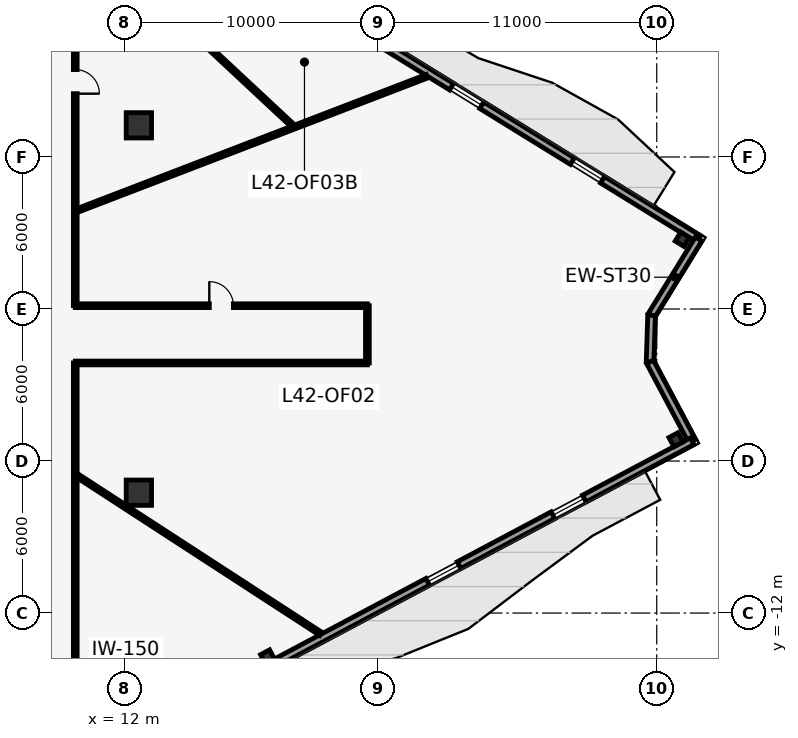
"""IFC4 building model, lengths in metres.
Left out: names, types, materials, properties, quantities, classifications, styles, units other than length and angle.
Written with IfcOpenShell. Run it as: python <this file> out.ifc"""

import sys

from ifc_helpers import new_model, si_unit, direction, frame, frame_2d, origin, origin_2d, place, context, subcontext, project, spatial, rectangle, i_section, extrude, element, fill, save


model = new_model("IFC4")
c1 = context("Model", 3, precision=1e-05, world=origin(), true_north=direction((0.0, 1.0)))
c2 = subcontext(c1, "Body", "Model", "MODEL_VIEW")
j1 = project(units=[si_unit("LENGTHUNIT", "METRE"), si_unit("PLANEANGLEUNIT", "RADIAN")], contexts=[c1])
p1 = place(None, origin())
s1 = spatial("IfcSite", under=j1, at=p1, CompositionType="ELEMENT")
p2 = place(p1, origin())
s2 = spatial("IfcBuilding", under=s1, at=p2, CompositionType="ELEMENT")
p3 = place(p2, frame((0.0, 0.0, 181.9)))
s3 = spatial("IfcBuildingStorey", under=s2, at=p3, CompositionType="ELEMENT", Elevation=181.9)
for number, where, z_axis, x_axis in (
    (1, (12.56, -7.25, 0.0), (0.0, 0.0, 1.0), (1.0, 0.0, 0.0)),
    (2, (12.56, 7.25, 0.0), (0.0, 0.0, 1.0), (1.0, 0.0, 0.0)),
):
    element("IfcColumn", number, at=place(p3, frame(where, z_axis=z_axis, x_axis=x_axis)), inside=s3, PredefinedType="COLUMN", context=c2, shape_type="SweptSolid", body=[
        extrude(rectangle(XDim=1.0, YDim=1.0, at=origin_2d()), origin(), (0.0, 0.0, 1.0), 4.1),
    ])
for number, where, z_axis, x_axis in (
    (3, (17.639, -13.731, 0.0), (0.0, 0.0, 1.0), (0.883, 0.469, 0.0)),
    (4, (33.759, -5.16, 0.0), (0.0, 0.0, 1.0), (0.883, 0.469, 0.0)),
    (5, (34.011, 2.752, 0.0), (0.0, 0.0, 1.0), (-0.851, 0.525, 0.0)),
):
    element("IfcColumn", number, at=place(p3, frame(where, z_axis=z_axis, x_axis=x_axis)), inside=s3, PredefinedType="COLUMN", context=c2, shape_type="SweptSolid", body=[
        extrude(i_section(OverallWidth=0.406, OverallDepth=0.417, WebThickness=0.03, FlangeThickness=0.048, at=origin_2d()), origin(), (0.0, 0.0, 1.0), 4.1),
    ])
p4 = place(p3, frame((-12.255, 31.689, 0.0), z_axis=(0.0, 0.0, 1.0), x_axis=(0.851166647402, -0.524895549944, 0.0)))
e6 = element("IfcWall", 6, at=p4, inside=s3, PredefinedType="STANDARD", context=c2, shape_type="SweptSolid", body=[
    extrude(rectangle(XDim=55.111, YDim=0.3, at=frame_2d((27.555, 0.0))), origin(), (0.0, 0.0, 1.0), 3.85),
])
p5 = place(p4, frame((27.055, 0.0, 0.0)))
e7 = element("IfcOpeningElement", 7, at=p5, cuts=e6, PredefinedType="OPENING", context=c2, shape_type="SweptSolid", body=[
    extrude(rectangle(XDim=1.0, YDim=2.15, at=frame_2d((0.5, 1.075))), frame((0.0, 0.16, 0.0), z_axis=(0.0, -1.0, 0.0), x_axis=(1.0, 0.0, 0.0)), (0.0, 0.0, 1.0), 0.32),
])
p6 = place(p4, frame((4.455, 0.0, 0.85)))
e8 = element("IfcOpeningElement", 8, at=p6, cuts=e6, PredefinedType="OPENING", context=c2, shape_type="SweptSolid", body=[
    extrude(rectangle(XDim=1.4, YDim=2.2, at=frame_2d((0.7, 1.1))), frame((0.0, 0.16, 0.0), z_axis=(0.0, -1.0, 0.0), x_axis=(1.0, 0.0, 0.0)), (0.0, 0.0, 1.0), 0.32),
])
p7 = place(p4, frame((10.055, 0.0, 0.85)))
e9 = element("IfcOpeningElement", 9, at=p7, cuts=e6, PredefinedType="OPENING", context=c2, shape_type="SweptSolid", body=[
    extrude(rectangle(XDim=1.4, YDim=2.2, at=frame_2d((0.7, 1.1))), frame((0.0, 0.16, 0.0), z_axis=(0.0, -1.0, 0.0), x_axis=(1.0, 0.0, 0.0)), (0.0, 0.0, 1.0), 0.32),
])
p8 = place(p4, frame((15.655, 0.0, 0.85)))
e10 = element("IfcOpeningElement", 10, at=p8, cuts=e6, PredefinedType="OPENING", context=c2, shape_type="SweptSolid", body=[
    extrude(rectangle(XDim=1.4, YDim=2.2, at=frame_2d((0.7, 1.1))), frame((0.0, 0.16, 0.0), z_axis=(0.0, -1.0, 0.0), x_axis=(1.0, 0.0, 0.0)), (0.0, 0.0, 1.0), 0.32),
])
p9 = place(p4, frame((21.255, 0.0, 0.85)))
e11 = element("IfcOpeningElement", 11, at=p9, cuts=e6, PredefinedType="OPENING", context=c2, shape_type="SweptSolid", body=[
    extrude(rectangle(XDim=1.4, YDim=2.2, at=frame_2d((0.7, 1.1))), frame((0.0, 0.16, 0.0), z_axis=(0.0, -1.0, 0.0), x_axis=(1.0, 0.0, 0.0)), (0.0, 0.0, 1.0), 0.32),
])
p10 = place(p4, frame((32.455, 0.0, 0.85)))
e12 = element("IfcOpeningElement", 12, at=p10, cuts=e6, PredefinedType="OPENING", context=c2, shape_type="SweptSolid", body=[
    extrude(rectangle(XDim=1.4, YDim=2.2, at=frame_2d((0.7, 1.1))), frame((0.0, 0.16, 0.0), z_axis=(0.0, -1.0, 0.0), x_axis=(1.0, 0.0, 0.0)), (0.0, 0.0, 1.0), 0.32),
])
p11 = place(p4, frame((38.055, 0.0, 0.85)))
e13 = element("IfcOpeningElement", 13, at=p11, cuts=e6, PredefinedType="OPENING", context=c2, shape_type="SweptSolid", body=[
    extrude(rectangle(XDim=1.4, YDim=2.2, at=frame_2d((0.7, 1.1))), frame((0.0, 0.16, 0.0), z_axis=(0.0, -1.0, 0.0), x_axis=(1.0, 0.0, 0.0)), (0.0, 0.0, 1.0), 0.32),
])
p12 = place(p4, frame((43.655, 0.0, 0.85)))
e14 = element("IfcOpeningElement", 14, at=p12, cuts=e6, PredefinedType="OPENING", context=c2, shape_type="SweptSolid", body=[
    extrude(rectangle(XDim=1.4, YDim=2.2, at=frame_2d((0.7, 1.1))), frame((0.0, 0.16, 0.0), z_axis=(0.0, -1.0, 0.0), x_axis=(1.0, 0.0, 0.0)), (0.0, 0.0, 1.0), 0.32),
])
p13 = place(p4, frame((49.255, 0.0, 0.85)))
e15 = element("IfcOpeningElement", 15, at=p13, cuts=e6, PredefinedType="OPENING", context=c2, shape_type="SweptSolid", body=[
    extrude(rectangle(XDim=1.4, YDim=2.2, at=frame_2d((0.7, 1.1))), frame((0.0, 0.16, 0.0), z_axis=(0.0, -1.0, 0.0), x_axis=(1.0, 0.0, 0.0)), (0.0, 0.0, 1.0), 0.32),
])
p14 = place(p3, frame((34.653, 2.762, 0.0), z_axis=(0.0, 0.0, 1.0), x_axis=(-0.524920336071, -0.85115136185, 0.0)))
e16 = element("IfcWall", 16, at=p14, inside=s3, PredefinedType="STANDARD", context=c2, shape_type="SweptSolid", body=[
    extrude(rectangle(XDim=3.541, YDim=0.3, at=frame_2d((1.771, 0.0))), origin(), (0.0, 0.0, 1.0), 3.85),
])
p15 = place(p3, frame((32.794, -0.252, 0.0), z_axis=(0.0, 0.0, 1.0), x_axis=(-0.031873247483, -0.999491918974, 0.0)))
e17 = element("IfcWall", 17, at=p15, inside=s3, PredefinedType="STANDARD", context=c2, shape_type="SweptSolid", body=[
    extrude(rectangle(XDim=1.838, YDim=0.3, at=frame_2d((0.919, 0.0))), origin(), (0.0, 0.0, 1.0), 3.85),
])
p16 = place(p3, frame((32.736, -2.09, 0.0), z_axis=(0.0, 0.0, 1.0), x_axis=(0.469464339615, -0.882951433449, 0.0)))
e18 = element("IfcWall", 18, at=p16, inside=s3, PredefinedType="STANDARD", context=c2, shape_type="SweptSolid", body=[
    extrude(rectangle(XDim=3.542, YDim=0.3, at=frame_2d((1.771, 0.0))), origin(), (0.0, 0.0, 1.0), 3.85),
])
p17 = place(p3, frame((34.398, -5.217, 0.0), z_axis=(0.0, 0.0, 1.0), x_axis=(-0.88294811928, -0.469470572731, 0.0)))
e19 = element("IfcWall", 19, at=p17, inside=s3, PredefinedType="STANDARD", context=c2, shape_type="SweptSolid", body=[
    extrude(rectangle(XDim=55.845, YDim=0.3, at=frame_2d((27.923, 0.0))), origin(), (0.0, 0.0, 1.0), 3.85),
])
p18 = place(p17, frame((27.423, 0.0, 0.0)))
e20 = element("IfcOpeningElement", 20, at=p18, cuts=e19, PredefinedType="OPENING", context=c2, shape_type="SweptSolid", body=[
    extrude(rectangle(XDim=1.0, YDim=2.15, at=frame_2d((0.5, 1.075))), frame((0.0, 0.16, 0.0), z_axis=(0.0, -1.0, 0.0), x_axis=(1.0, 0.0, 0.0)), (0.0, 0.0, 1.0), 0.32),
])
p19 = place(p17, frame((4.823, 0.0, 0.85)))
e21 = element("IfcOpeningElement", 21, at=p19, cuts=e19, PredefinedType="OPENING", context=c2, shape_type="SweptSolid", body=[
    extrude(rectangle(XDim=1.4, YDim=2.2, at=frame_2d((0.7, 1.1))), frame((0.0, 0.16, 0.0), z_axis=(0.0, -1.0, 0.0), x_axis=(1.0, 0.0, 0.0)), (0.0, 0.0, 1.0), 0.32),
])
p20 = place(p17, frame((10.423, 0.0, 0.85)))
e22 = element("IfcOpeningElement", 22, at=p20, cuts=e19, PredefinedType="OPENING", context=c2, shape_type="SweptSolid", body=[
    extrude(rectangle(XDim=1.4, YDim=2.2, at=frame_2d((0.7, 1.1))), frame((0.0, 0.16, 0.0), z_axis=(0.0, -1.0, 0.0), x_axis=(1.0, 0.0, 0.0)), (0.0, 0.0, 1.0), 0.32),
])
p21 = place(p17, frame((21.623, 0.0, 0.85)))
e23 = element("IfcOpeningElement", 23, at=p21, cuts=e19, PredefinedType="OPENING", context=c2, shape_type="SweptSolid", body=[
    extrude(rectangle(XDim=1.4, YDim=2.2, at=frame_2d((0.7, 1.1))), frame((0.0, 0.16, 0.0), z_axis=(0.0, -1.0, 0.0), x_axis=(1.0, 0.0, 0.0)), (0.0, 0.0, 1.0), 0.32),
])
p22 = place(p17, frame((32.823, 0.0, 0.85)))
e24 = element("IfcOpeningElement", 24, at=p22, cuts=e19, PredefinedType="OPENING", context=c2, shape_type="SweptSolid", body=[
    extrude(rectangle(XDim=1.4, YDim=2.2, at=frame_2d((0.7, 1.1))), frame((0.0, 0.16, 0.0), z_axis=(0.0, -1.0, 0.0), x_axis=(1.0, 0.0, 0.0)), (0.0, 0.0, 1.0), 0.32),
])
p23 = place(p17, frame((38.423, 0.0, 0.85)))
e25 = element("IfcOpeningElement", 25, at=p23, cuts=e19, PredefinedType="OPENING", context=c2, shape_type="SweptSolid", body=[
    extrude(rectangle(XDim=1.4, YDim=2.2, at=frame_2d((0.7, 1.1))), frame((0.0, 0.16, 0.0), z_axis=(0.0, -1.0, 0.0), x_axis=(1.0, 0.0, 0.0)), (0.0, 0.0, 1.0), 0.32),
])
p24 = place(p17, frame((44.023, 0.0, 0.85)))
e26 = element("IfcOpeningElement", 26, at=p24, cuts=e19, PredefinedType="OPENING", context=c2, shape_type="SweptSolid", body=[
    extrude(rectangle(XDim=1.4, YDim=2.2, at=frame_2d((0.7, 1.1))), frame((0.0, 0.16, 0.0), z_axis=(0.0, -1.0, 0.0), x_axis=(1.0, 0.0, 0.0)), (0.0, 0.0, 1.0), 0.32),
])
p25 = place(p17, frame((49.623, 0.0, 0.85)))
e27 = element("IfcOpeningElement", 27, at=p25, cuts=e19, PredefinedType="OPENING", context=c2, shape_type="SweptSolid", body=[
    extrude(rectangle(XDim=1.4, YDim=2.2, at=frame_2d((0.7, 1.1))), frame((0.0, 0.16, 0.0), z_axis=(0.0, -1.0, 0.0), x_axis=(1.0, 0.0, 0.0)), (0.0, 0.0, 1.0), 0.32),
])
p26 = place(p3, frame((10.05, 14.31, 0.0), z_axis=(0.0, 0.0, 1.0), x_axis=(0.0, -1.0, 0.0)))
e28 = element("IfcWall", 28, at=p26, inside=s3, PredefinedType="PARTITIONING", context=c2, shape_type="SweptSolid", body=[
    extrude(rectangle(XDim=14.18, YDim=0.15, at=frame_2d((7.09, 0.0))), origin(), (0.0, 0.0, 1.0), 3.85),
])
p27 = place(p26, frame((4.861, 0.0, 0.0)))
e29 = element("IfcOpeningElement", 29, at=p27, cuts=e28, PredefinedType="OPENING", context=c2, shape_type="SweptSolid", body=[
    extrude(rectangle(XDim=0.95, YDim=2.15, at=frame_2d((0.475, 1.075))), frame((0.0, 0.085, 0.0), z_axis=(0.0, -1.0, 0.0), x_axis=(1.0, 0.0, 0.0)), (0.0, 0.0, 1.0), 0.17),
])
p28 = place(p3, frame((10.05, 0.13, 0.0), z_axis=(0.0, 0.0, 1.0), x_axis=(1.0, 0.0, 0.0)))
e30 = element("IfcWall", 30, at=p28, inside=s3, PredefinedType="PARTITIONING", context=c2, shape_type="SweptSolid", body=[
    extrude(rectangle(XDim=11.53, YDim=0.15, at=frame_2d((5.765, 0.0))), origin(), (0.0, 0.0, 1.0), 3.85),
])
p29 = place(p28, frame((5.29, 0.0, 0.0)))
e31 = element("IfcOpeningElement", 31, at=p29, cuts=e30, PredefinedType="OPENING", context=c2, shape_type="SweptSolid", body=[
    extrude(rectangle(XDim=0.95, YDim=2.15, at=frame_2d((0.475, 1.075))), frame((0.0, 0.085, 0.0), z_axis=(0.0, -1.0, 0.0), x_axis=(1.0, 0.0, 0.0)), (0.0, 0.0, 1.0), 0.17),
])
p30 = place(p3, frame((21.58, 0.13, 0.0), z_axis=(0.0, 0.0, 1.0), x_axis=(0.0, -1.0, 0.0)))
e32 = element("IfcWall", 32, at=p30, inside=s3, PredefinedType="PARTITIONING", context=c2, shape_type="SweptSolid", body=[
    extrude(rectangle(XDim=2.26, YDim=0.15, at=frame_2d((1.13, 0.0))), origin(), (0.0, 0.0, 1.0), 3.85),
])
p31 = place(p3, frame((21.58, -2.13, 0.0), z_axis=(0.0, 0.0, 1.0), x_axis=(-1.0, 0.0, 0.0)))
e33 = element("IfcWall", 33, at=p31, inside=s3, PredefinedType="PARTITIONING", context=c2, shape_type="SweptSolid", body=[
    extrude(rectangle(XDim=11.53, YDim=0.15, at=frame_2d((5.765, 0.0))), origin(), (0.0, 0.0, 1.0), 3.85),
])
p32 = place(p3, frame((10.05, -2.13, 0.0), z_axis=(0.0, 0.0, 1.0), x_axis=(0.0, -1.0, 0.0)))
e34 = element("IfcWall", 34, at=p32, inside=s3, PredefinedType="PARTITIONING", context=c2, shape_type="SweptSolid", body=[
    extrude(rectangle(XDim=12.539, YDim=0.15, at=frame_2d((6.27, 0.0))), origin(), (0.0, 0.0, 1.0), 3.85),
])
p33 = place(p3, frame((10.155, 3.898, 0.0), z_axis=(0.0, 0.0, 1.0), x_axis=(0.933582173368, 0.358363398759, 0.0)))
e35 = element("IfcWall", 35, at=p33, inside=s3, PredefinedType="PARTITIONING", context=c2, shape_type="SweptSolid", body=[
    extrude(rectangle(XDim=14.75, YDim=0.15, at=frame_2d((7.375, 0.0))), origin(), (0.0, 0.0, 1.0), 3.85),
])
p34 = place(p3, frame((10.155, -6.595, 0.0), z_axis=(0.0, 0.0, 1.0), x_axis=(0.838665527381, -0.544646796725, 0.0)))
e36 = element("IfcWall", 36, at=p34, inside=s3, PredefinedType="PARTITIONING", context=c2, shape_type="SweptSolid", body=[
    extrude(rectangle(XDim=11.433, YDim=0.15, at=frame_2d((5.717, 0.0))), origin(), (0.0, 0.0, 1.0), 3.85),
])
p35 = place(p3, frame((18.675, 7.196, 0.0), z_axis=(0.0, 0.0, 1.0), x_axis=(-0.731248253025, 0.682111422312, 0.0)))
e37 = element("IfcWall", 37, at=p35, inside=s3, PredefinedType="PARTITIONING", context=c2, shape_type="SweptSolid", body=[
    extrude(rectangle(XDim=20.863, YDim=0.15, at=frame_2d((10.432, 0.0))), origin(), (0.0, 0.0, 1.0), 3.85),
])
p36 = place(p35, frame((9.982, 0.0, 0.0)))
e38 = element("IfcOpeningElement", 38, at=p36, cuts=e37, PredefinedType="OPENING", context=c2, shape_type="SweptSolid", body=[
    extrude(rectangle(XDim=0.9, YDim=2.1, at=frame_2d((0.45, 1.05))), frame((0.0, 0.085, 0.0), z_axis=(0.0, -1.0, 0.0), x_axis=(1.0, 0.0, 0.0)), (0.0, 0.0, 1.0), 0.17),
])
p37 = place(p12, origin())
e39 = element("IfcWindow", 39, at=p37, inside=s3, PartitioningType="SINGLE_PANEL", PredefinedType="WINDOW", context=c2, shape_type="SweptSolid", body=[
    extrude(rectangle(XDim=1.4, YDim=2.2, at=frame_2d((0.7, 1.1))), frame((0.0, 0.03, 0.0), z_axis=(0.0, -1.0, 0.0), x_axis=(1.0, 0.0, 0.0)), (0.0, 0.0, 1.0), 0.06),
])
fill(e14, e39)
p38 = place(p13, origin())
e40 = element("IfcWindow", 40, at=p38, inside=s3, PartitioningType="SINGLE_PANEL", PredefinedType="WINDOW", context=c2, shape_type="SweptSolid", body=[
    extrude(rectangle(XDim=1.4, YDim=2.2, at=frame_2d((0.7, 1.1))), frame((0.0, 0.03, 0.0), z_axis=(0.0, -1.0, 0.0), x_axis=(1.0, 0.0, 0.0)), (0.0, 0.0, 1.0), 0.06),
])
fill(e15, e40)
p39 = place(p19, origin())
e41 = element("IfcWindow", 41, at=p39, inside=s3, PartitioningType="SINGLE_PANEL", PredefinedType="WINDOW", context=c2, shape_type="SweptSolid", body=[
    extrude(rectangle(XDim=1.4, YDim=2.2, at=frame_2d((0.7, 1.1))), frame((0.0, 0.03, 0.0), z_axis=(0.0, -1.0, 0.0), x_axis=(1.0, 0.0, 0.0)), (0.0, 0.0, 1.0), 0.06),
])
fill(e21, e41)
p40 = place(p20, origin())
e42 = element("IfcWindow", 42, at=p40, inside=s3, PartitioningType="SINGLE_PANEL", PredefinedType="WINDOW", context=c2, shape_type="SweptSolid", body=[
    extrude(rectangle(XDim=1.4, YDim=2.2, at=frame_2d((0.7, 1.1))), frame((0.0, 0.03, 0.0), z_axis=(0.0, -1.0, 0.0), x_axis=(1.0, 0.0, 0.0)), (0.0, 0.0, 1.0), 0.06),
])
fill(e22, e42)
p41 = place(p29, origin())
e43 = element("IfcDoor", 43, at=p41, inside=s3, OperationType="SINGLE_SWING_LEFT", PredefinedType="DOOR", context=c2, shape_type="SweptSolid", body=[
    extrude(rectangle(XDim=0.95, YDim=2.15, at=frame_2d((0.475, 1.075))), frame((0.0, 0.025, 0.0), z_axis=(0.0, -1.0, 0.0), x_axis=(1.0, 0.0, 0.0)), (0.0, 0.0, 1.0), 0.05),
])
fill(e31, e43)
p42 = place(p27, origin())
e44 = element("IfcDoor", 44, at=p42, inside=s3, OperationType="SINGLE_SWING_RIGHT", PredefinedType="DOOR", context=c2, shape_type="SweptSolid", body=[
    extrude(rectangle(XDim=0.95, YDim=2.15, at=frame_2d((0.475, 1.075))), frame((0.0, 0.025, 0.0), z_axis=(0.0, -1.0, 0.0), x_axis=(1.0, 0.0, 0.0)), (0.0, 0.0, 1.0), 0.05),
])
fill(e29, e44)
save(model, sys.argv[1])
